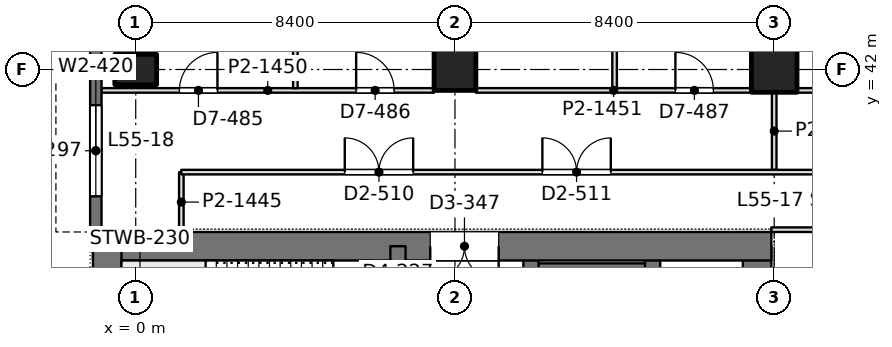
"""IFC4 building model, lengths in metres.
Left out: names, types, materials, properties, quantities, classifications, styles, units other than length and angle.
Written with IfcOpenShell. Run it as: python <this file> out.ifc"""

import sys

from ifc_helpers import new_model, si_unit, direction, frame, frame_2d, origin, origin_2d, place, context, subcontext, project, spatial, rectangle, extrude, element, fill, save


model = new_model("IFC4")
c1 = context("Model", 3, precision=1e-05, world=origin(), true_north=direction((0.0, 1.0)))
c2 = subcontext(c1, "Body", "Model", "MODEL_VIEW")
j1 = project(units=[si_unit("LENGTHUNIT", "METRE"), si_unit("PLANEANGLEUNIT", "RADIAN")], contexts=[c1])
p1 = place(None, origin())
s1 = spatial("IfcSite", under=j1, at=p1, CompositionType="ELEMENT")
p2 = place(p1, origin())
s2 = spatial("IfcBuilding", under=s1, at=p2, CompositionType="ELEMENT")
p3 = place(p2, frame((0.0, 0.0, 240.6)))
s3 = spatial("IfcBuildingStorey", under=s2, at=p3, CompositionType="ELEMENT", Elevation=240.6)
p4 = place(p3, frame((0.0, 42.0, 0.0), z_axis=(0.0, 0.0, 1.0), x_axis=(0.0, 1.0, 0.0)))
e1 = element("IfcColumn", 1, at=p4, inside=s3, PredefinedType="COLUMN", context=c2, shape_type="SweptSolid", body=[
    extrude(rectangle(XDim=0.8, YDim=1.1, at=origin_2d()), origin(), (0.0, 0.0, 1.0), 4.2),
])
p5 = place(p3, frame((8.4, 42.0, 0.0), z_axis=(0.0, 0.0, 1.0), x_axis=(1.0, 0.0, 0.0)))
e2 = element("IfcColumn", 2, at=p5, inside=s3, PredefinedType="COLUMN", context=c2, shape_type="SweptSolid", body=[
    extrude(rectangle(XDim=1.1, YDim=1.1, at=origin_2d()), origin(), (0.0, 0.0, 1.0), 4.2),
])
p6 = place(p3, frame((16.8, 42.0, 0.0), z_axis=(0.0, 0.0, 1.0), x_axis=(1.0, 0.0, 0.0)))
e3 = element("IfcColumn", 3, at=p6, inside=s3, PredefinedType="COLUMN", context=c2, shape_type="SweptSolid", body=[
    extrude(rectangle(XDim=1.2, YDim=1.2, at=origin_2d()), origin(), (0.0, 0.0, 1.0), 4.2),
])
p7 = place(p3, frame((-1.125, 37.35, 0.0), z_axis=(0.0, 0.0, 1.0), x_axis=(1.0, 0.0, 0.0)))
e4 = element("IfcWall", 4, at=p7, inside=s3, PredefinedType="SHEAR", context=c2, shape_type="SweptSolid", body=[
    extrude(rectangle(XDim=17.85, YDim=0.75, at=frame_2d((8.925, 0.0))), origin(), (0.0, 0.0, 1.0), 4.2),
])
p8 = place(p7, frame((8.875, 0.0, 0.0)))
e5 = element("IfcOpeningElement", 5, at=p8, cuts=e4, PredefinedType="OPENING", context=c2, shape_type="SweptSolid", body=[
    extrude(rectangle(XDim=1.8, YDim=2.4, at=frame_2d((0.9, 1.2))), frame((0.0, 0.385, 0.0), z_axis=(0.0, -1.0, 0.0), x_axis=(1.0, 0.0, 0.0)), (0.0, 0.0, 1.0), 0.77),
])
p9 = place(p3, frame((-0.75, 13.05, 0.0), z_axis=(0.0, 0.0, 1.0), x_axis=(0.0, 1.0, 0.0)))
e6 = element("IfcWall", 6, at=p9, inside=s3, PredefinedType="SHEAR", context=c2, shape_type="SweptSolid", body=[
    extrude(rectangle(XDim=24.3, YDim=0.75, at=frame_2d((12.15, 0.0))), origin(), (0.0, 0.0, 1.0), 4.2),
])
p10 = place(p3, frame((16.35, 27.8, 0.0), z_axis=(0.0, 0.0, 1.0), x_axis=(0.0, 1.0, 0.0)))
e7 = element("IfcWall", 7, at=p10, inside=s3, PredefinedType="SHEAR", context=c2, shape_type="SweptSolid", body=[
    extrude(rectangle(XDim=9.55, YDim=0.75, at=frame_2d((4.775, 0.0))), origin(), (0.0, 0.0, 1.0), 4.2),
])
p11 = place(p3, frame((6.9, 13.05, 0.0), z_axis=(0.0, 0.0, 1.0), x_axis=(0.0, 1.0, 0.0)))
e8 = element("IfcWall", 8, at=p11, inside=s3, PredefinedType="SHEAR", context=c2, shape_type="SweptSolid", body=[
    extrude(rectangle(XDim=24.3, YDim=0.4, at=frame_2d((12.15, 0.0))), origin(), (0.0, 0.0, 1.0), 4.2),
])
p12 = place(p11, frame((1.3, 0.0, 0.0)))
e9 = element("IfcOpeningElement", 9, at=p12, cuts=e8, PredefinedType="OPENING", context=c2, shape_type="SweptSolid", body=[
    extrude(rectangle(XDim=1.0, YDim=2.2, at=frame_2d((0.5, 1.1))), frame((0.0, 0.21, 0.0), z_axis=(0.0, -1.0, 0.0), x_axis=(1.0, 0.0, 0.0)), (0.0, 0.0, 1.0), 0.42),
])
p13 = place(p11, frame((22.0, 0.0, 0.0)))
e10 = element("IfcOpeningElement", 10, at=p13, cuts=e8, PredefinedType="OPENING", context=c2, shape_type="SweptSolid", body=[
    extrude(rectangle(XDim=1.0, YDim=2.2, at=frame_2d((0.5, 1.1))), frame((0.0, 0.21, 0.0), z_axis=(0.0, -1.0, 0.0), x_axis=(1.0, 0.0, 0.0)), (0.0, 0.0, 1.0), 0.42),
])
p14 = place(p11, frame((5.55, 0.0, 0.0)))
e11 = element("IfcOpeningElement", 11, at=p14, cuts=e8, PredefinedType="OPENING", context=c2, shape_type="SweptSolid", body=[
    extrude(rectangle(XDim=1.0, YDim=2.2, at=frame_2d((0.5, 1.1))), frame((0.0, 0.21, 0.0), z_axis=(0.0, -1.0, 0.0), x_axis=(1.0, 0.0, 0.0)), (0.0, 0.0, 1.0), 0.42),
])
p15 = place(p11, frame((9.55, 0.0, 0.0)))
e12 = element("IfcOpeningElement", 12, at=p15, cuts=e8, PredefinedType="OPENING", context=c2, shape_type="SweptSolid", body=[
    extrude(rectangle(XDim=1.0, YDim=2.2, at=frame_2d((0.5, 1.1))), frame((0.0, 0.21, 0.0), z_axis=(0.0, -1.0, 0.0), x_axis=(1.0, 0.0, 0.0)), (0.0, 0.0, 1.0), 0.42),
])
p16 = place(p11, frame((12.8, 0.0, 0.0)))
e13 = element("IfcOpeningElement", 13, at=p16, cuts=e8, PredefinedType="OPENING", context=c2, shape_type="SweptSolid", body=[
    extrude(rectangle(XDim=1.1, YDim=2.2, at=frame_2d((0.55, 1.1))), frame((0.0, 0.21, 0.0), z_axis=(0.0, -1.0, 0.0), x_axis=(1.0, 0.0, 0.0)), (0.0, 0.0, 1.0), 0.42),
])
p17 = place(p11, frame((15.538, 0.0, 0.0)))
e14 = element("IfcOpeningElement", 14, at=p17, cuts=e8, PredefinedType="OPENING", context=c2, shape_type="SweptSolid", body=[
    extrude(rectangle(XDim=1.1, YDim=2.2, at=frame_2d((0.55, 1.1))), frame((0.0, 0.21, 0.0), z_axis=(0.0, -1.0, 0.0), x_axis=(1.0, 0.0, 0.0)), (0.0, 0.0, 1.0), 0.42),
])
p18 = place(p11, frame((18.262, 0.0, 0.0)))
e15 = element("IfcOpeningElement", 15, at=p18, cuts=e8, PredefinedType="OPENING", context=c2, shape_type="SweptSolid", body=[
    extrude(rectangle(XDim=1.1, YDim=2.2, at=frame_2d((0.55, 1.1))), frame((0.0, 0.21, 0.0), z_axis=(0.0, -1.0, 0.0), x_axis=(1.0, 0.0, 0.0)), (0.0, 0.0, 1.0), 0.42),
])
p19 = place(p3, frame((10.4, 13.05, 0.0), z_axis=(0.0, 0.0, 1.0), x_axis=(0.0, 1.0, 0.0)))
e16 = element("IfcWall", 16, at=p19, inside=s3, PredefinedType="SHEAR", context=c2, shape_type="SweptSolid", body=[
    extrude(rectangle(XDim=24.3, YDim=0.4, at=frame_2d((12.15, 0.0))), origin(), (0.0, 0.0, 1.0), 4.2),
])
p20 = place(p19, frame((15.75, 0.0, 0.0)))
e17 = element("IfcOpeningElement", 17, at=p20, cuts=e16, PredefinedType="OPENING", context=c2, shape_type="SweptSolid", body=[
    extrude(rectangle(XDim=1.1, YDim=2.2, at=frame_2d((0.55, 1.1))), frame((0.0, 0.21, 0.0), z_axis=(0.0, -1.0, 0.0), x_axis=(1.0, 0.0, 0.0)), (0.0, 0.0, 1.0), 0.42),
])
p21 = place(p19, frame((18.6, 0.0, 0.0)))
e18 = element("IfcOpeningElement", 18, at=p21, cuts=e16, PredefinedType="OPENING", context=c2, shape_type="SweptSolid", body=[
    extrude(rectangle(XDim=1.1, YDim=2.2, at=frame_2d((0.55, 1.1))), frame((0.0, 0.21, 0.0), z_axis=(0.0, -1.0, 0.0), x_axis=(1.0, 0.0, 0.0)), (0.0, 0.0, 1.0), 0.42),
])
p22 = place(p19, frame((21.45, 0.0, 0.0)))
e19 = element("IfcOpeningElement", 19, at=p22, cuts=e16, PredefinedType="OPENING", context=c2, shape_type="SweptSolid", body=[
    extrude(rectangle(XDim=1.1, YDim=2.2, at=frame_2d((0.55, 1.1))), frame((0.0, 0.21, 0.0), z_axis=(0.0, -1.0, 0.0), x_axis=(1.0, 0.0, 0.0)), (0.0, 0.0, 1.0), 0.42),
])
p23 = place(p19, frame((8.65, 0.0, 0.0)))
e20 = element("IfcOpeningElement", 20, at=p23, cuts=e16, PredefinedType="OPENING", context=c2, shape_type="SweptSolid", body=[
    extrude(rectangle(XDim=1.8, YDim=2.4, at=frame_2d((0.9, 1.2))), frame((0.0, 0.21, 0.0), z_axis=(0.0, -1.0, 0.0), x_axis=(1.0, 0.0, 0.0)), (0.0, 0.0, 1.0), 0.42),
])
p24 = place(p3, frame((13.6, 27.925, 0.0), z_axis=(0.0, 0.0, 1.0), x_axis=(0.0, 1.0, 0.0)))
e21 = element("IfcWall", 21, at=p24, inside=s3, PredefinedType="SHEAR", context=c2, shape_type="SweptSolid", body=[
    extrude(rectangle(XDim=9.425, YDim=0.4, at=frame_2d((4.712, 0.0))), origin(), (0.0, 0.0, 1.0), 4.2),
])
p25 = place(p3, frame((10.4, 36.625, 0.0), z_axis=(0.0, 0.0, 1.0), x_axis=(1.0, 0.0, 0.0)))
e22 = element("IfcWall", 22, at=p25, inside=s3, PredefinedType="SHEAR", context=c2, shape_type="SweptSolid", body=[
    extrude(rectangle(XDim=3.2, YDim=0.55, at=frame_2d((1.6, 0.0))), origin(), (0.0, 0.0, 1.0), 4.2),
])
p26 = place(p3, frame((-1.05, 37.725, 0.0), z_axis=(0.0, 0.0, 1.0), x_axis=(0.0, 1.0, 0.0)))
e23 = element("IfcWall", 23, at=p26, inside=s3, PredefinedType="SOLIDWALL", context=c2, shape_type="SweptSolid", body=[
    extrude(rectangle(XDim=4.275, YDim=0.3, at=frame_2d((2.137, 0.0))), origin(), (0.0, 0.0, 1.0), 4.0),
])
p27 = place(p26, frame((0.938, 0.0, 0.9)))
e24 = element("IfcOpeningElement", 24, at=p27, cuts=e23, PredefinedType="OPENING", context=c2, shape_type="SweptSolid", body=[
    extrude(rectangle(XDim=2.4, YDim=1.9, at=frame_2d((1.2, 0.95))), frame((0.0, 0.16, 0.0), z_axis=(0.0, -1.0, 0.0), x_axis=(1.0, 0.0, 0.0)), (0.0, 0.0, 1.0), 0.32),
])
p28 = place(p3, frame((-1.05, 42.0, 0.0), z_axis=(0.0, 0.0, 1.0), x_axis=(0.0, 1.0, 0.0)))
e25 = element("IfcWall", 25, at=p28, inside=s3, PredefinedType="SOLIDWALL", context=c2, shape_type="SweptSolid", body=[
    extrude(rectangle(XDim=2.485, YDim=0.3, at=frame_2d((1.243, 0.0))), origin(), (0.0, 0.0, 1.0), 4.0),
])
p29 = place(p3, frame((-0.902, 41.45, 0.0), z_axis=(0.0, 0.0, 1.0), x_axis=(1.0, 0.0, 0.0)))
e26 = element("IfcWall", 26, at=p29, inside=s3, PredefinedType="PARTITIONING", context=c2, shape_type="SweptSolid", body=[
    extrude(rectangle(XDim=8.751, YDim=0.12, at=frame_2d((4.375, 0.0))), origin(), (0.0, 0.0, 1.0), 3.4),
])
p30 = place(p29, frame((2.052, 0.0, 0.0)))
e27 = element("IfcOpeningElement", 27, at=p30, cuts=e26, PredefinedType="OPENING", context=c2, shape_type="SweptSolid", body=[
    extrude(rectangle(XDim=1.0, YDim=2.4, at=frame_2d((0.5, 1.2))), frame((0.0, 0.07, 0.0), z_axis=(0.0, -1.0, 0.0), x_axis=(1.0, 0.0, 0.0)), (0.0, 0.0, 1.0), 0.14),
])
p31 = place(p29, frame((6.702, 0.0, 0.0)))
e28 = element("IfcOpeningElement", 28, at=p31, cuts=e26, PredefinedType="OPENING", context=c2, shape_type="SweptSolid", body=[
    extrude(rectangle(XDim=1.0, YDim=2.4, at=frame_2d((0.5, 1.2))), frame((0.0, 0.07, 0.0), z_axis=(0.0, -1.0, 0.0), x_axis=(1.0, 0.0, 0.0)), (0.0, 0.0, 1.0), 0.14),
])
p32 = place(p3, frame((8.951, 41.45, 0.0), z_axis=(0.0, 0.0, 1.0), x_axis=(1.0, 0.0, 0.0)))
e29 = element("IfcWall", 29, at=p32, inside=s3, PredefinedType="PARTITIONING", context=c2, shape_type="SweptSolid", body=[
    extrude(rectangle(XDim=7.25, YDim=0.12, at=frame_2d((3.625, 0.0))), origin(), (0.0, 0.0, 1.0), 3.4),
])
p33 = place(p32, frame((5.249, 0.0, 0.0)))
e30 = element("IfcOpeningElement", 30, at=p33, cuts=e29, PredefinedType="OPENING", context=c2, shape_type="SweptSolid", body=[
    extrude(rectangle(XDim=1.0, YDim=2.4, at=frame_2d((0.5, 1.2))), frame((0.0, 0.07, 0.0), z_axis=(0.0, -1.0, 0.0), x_axis=(1.0, 0.0, 0.0)), (0.0, 0.0, 1.0), 0.14),
])
p34 = place(p3, frame((17.399, 41.45, 0.0), z_axis=(0.0, 0.0, 1.0), x_axis=(1.0, 0.0, 0.0)))
e31 = element("IfcWall", 31, at=p34, inside=s3, PredefinedType="PARTITIONING", context=c2, shape_type="SweptSolid", body=[
    extrude(rectangle(XDim=7.25, YDim=0.12, at=frame_2d((3.625, 0.0))), origin(), (0.0, 0.0, 1.0), 3.4),
])
p35 = place(p34, frame((4.801, 0.0, 0.0)))
e32 = element("IfcOpeningElement", 32, at=p35, cuts=e31, PredefinedType="OPENING", context=c2, shape_type="SweptSolid", body=[
    extrude(rectangle(XDim=1.8, YDim=2.2, at=frame_2d((0.9, 1.1))), frame((0.0, 0.07, 0.0), z_axis=(0.0, -1.0, 0.0), x_axis=(1.0, 0.0, 0.0)), (0.0, 0.0, 1.0), 0.14),
])
for number, where, z_axis, x_axis in (
    (33, (4.2, 41.508, 0.0), (0.0, 0.0, 1.0), (0.0, 1.0, 0.0)),
    (34, (12.6, 41.508, 0.0), (0.0, 0.0, 1.0), (0.0, 1.0, 0.0)),
):
    element("IfcWall", number, at=place(p3, frame(where, z_axis=z_axis, x_axis=x_axis)), inside=s3, PredefinedType="PARTITIONING", context=c2, shape_type="SweptSolid", body=[
        extrude(rectangle(XDim=4.194, YDim=0.12, at=frame_2d((2.097, 0.0))), origin(), (0.0, 0.0, 1.0), 3.3),
    ])
p36 = place(p3, frame((16.8, 39.358, 0.0), z_axis=(0.0, 0.0, 1.0), x_axis=(0.0, 1.0, 0.0)))
e35 = element("IfcWall", 35, at=p36, inside=s3, PredefinedType="PARTITIONING", context=c2, shape_type="SweptSolid", body=[
    extrude(rectangle(XDim=2.043, YDim=0.12, at=frame_2d((1.021, 0.0))), origin(), (0.0, 0.0, 1.0), 3.543),
])
p37 = place(p3, frame((1.2, 39.3, 0.0), z_axis=(0.0, 0.0, 1.0), x_axis=(1.0, 0.0, 0.0)))
e36 = element("IfcWall", 36, at=p37, inside=s3, PredefinedType="PARTITIONING", context=c2, shape_type="SweptSolid", body=[
    extrude(rectangle(XDim=41.452, YDim=0.12, at=frame_2d((20.726, 0.0))), origin(), (0.0, 0.0, 1.0), 3.3),
])
p38 = place(p37, frame((4.3, 0.0, 0.0)))
e37 = element("IfcOpeningElement", 37, at=p38, cuts=e36, PredefinedType="OPENING", context=c2, shape_type="SweptSolid", body=[
    extrude(rectangle(XDim=1.8, YDim=2.2, at=frame_2d((0.9, 1.1))), frame((0.0, 0.07, 0.0), z_axis=(0.0, -1.0, 0.0), x_axis=(1.0, 0.0, 0.0)), (0.0, 0.0, 1.0), 0.14),
])
p39 = place(p37, frame((9.5, 0.0, 0.0)))
e38 = element("IfcOpeningElement", 38, at=p39, cuts=e36, PredefinedType="OPENING", context=c2, shape_type="SweptSolid", body=[
    extrude(rectangle(XDim=1.8, YDim=2.2, at=frame_2d((0.9, 1.1))), frame((0.0, 0.07, 0.0), z_axis=(0.0, -1.0, 0.0), x_axis=(1.0, 0.0, 0.0)), (0.0, 0.0, 1.0), 0.14),
])
p40 = place(p37, frame((23.317, 0.0, 0.0)))
e39 = element("IfcOpeningElement", 39, at=p40, cuts=e36, PredefinedType="OPENING", context=c2, shape_type="SweptSolid", body=[
    extrude(rectangle(XDim=1.8, YDim=2.2, at=frame_2d((0.9, 1.1))), frame((0.0, 0.07, 0.0), z_axis=(0.0, -1.0, 0.0), x_axis=(1.0, 0.0, 0.0)), (0.0, 0.0, 1.0), 0.14),
])
p41 = place(p37, frame((33.0, 0.0, 0.0)))
e40 = element("IfcOpeningElement", 40, at=p41, cuts=e36, PredefinedType="OPENING", context=c2, shape_type="SweptSolid", body=[
    extrude(rectangle(XDim=1.8, YDim=2.2, at=frame_2d((0.9, 1.1))), frame((0.0, 0.07, 0.0), z_axis=(0.0, -1.0, 0.0), x_axis=(1.0, 0.0, 0.0)), (0.0, 0.0, 1.0), 0.14),
])
p42 = place(p3, frame((1.2, 37.724, 0.0), z_axis=(0.0, 0.0, 1.0), x_axis=(0.0, 1.0, 0.0)))
e41 = element("IfcWall", 41, at=p42, inside=s3, PredefinedType="PARTITIONING", context=c2, shape_type="SweptSolid", body=[
    extrude(rectangle(XDim=1.576, YDim=0.12, at=frame_2d((0.788, 0.0))), origin(), (0.0, 0.0, 1.0), 4.0),
])
p43 = place(p3, frame((16.725, 37.785, 0.0), z_axis=(0.0, 0.0, 1.0), x_axis=(1.0, 0.0, 0.0)))
e42 = element("IfcWall", 42, at=p43, inside=s3, PredefinedType="PARTITIONING", context=c2, shape_type="SweptSolid", body=[
    extrude(rectangle(XDim=16.95, YDim=0.12, at=frame_2d((8.475, 0.0))), origin(), (0.0, 0.0, 1.0), 3.3),
])
p44 = place(p43, frame((7.575, 0.0, 0.0)))
e43 = element("IfcOpeningElement", 43, at=p44, cuts=e42, PredefinedType="OPENING", context=c2, shape_type="SweptSolid", body=[
    extrude(rectangle(XDim=1.8, YDim=2.2, at=frame_2d((0.9, 1.1))), frame((0.0, 0.07, 0.0), z_axis=(0.0, -1.0, 0.0), x_axis=(1.0, 0.0, 0.0)), (0.0, 0.0, 1.0), 0.14),
])
p45 = place(p27, origin())
e44 = element("IfcWindow", 44, at=p45, inside=s3, PartitioningType="SINGLE_PANEL", PredefinedType="WINDOW", context=c2, shape_type="SweptSolid", body=[
    extrude(rectangle(XDim=2.4, YDim=1.9, at=frame_2d((1.2, 0.95))), frame((0.0, 0.03, 0.0), z_axis=(0.0, -1.0, 0.0), x_axis=(1.0, 0.0, 0.0)), (0.0, 0.0, 1.0), 0.06),
])
fill(e24, e44)
p46 = place(p8, frame((1.8, 0.0, 0.0), z_axis=(0.0, 0.0, 1.0), x_axis=(-1.0, 0.0, 0.0)))
e45 = element("IfcDoor", 45, at=p46, inside=s3, OperationType="DOUBLE_DOOR_SINGLE_SWING", PredefinedType="DOOR", context=c2, shape_type="SweptSolid", body=[
    extrude(rectangle(XDim=1.8, YDim=2.4, at=frame_2d((0.9, 1.2))), frame((0.0, 0.025, 0.0), z_axis=(0.0, -1.0, 0.0), x_axis=(1.0, 0.0, 0.0)), (0.0, 0.0, 1.0), 0.05),
])
fill(e5, e45)
p47 = place(p30, origin())
e46 = element("IfcDoor", 46, at=p47, inside=s3, OperationType="SINGLE_SWING_RIGHT", PredefinedType="DOOR", context=c2, shape_type="SweptSolid", body=[
    extrude(rectangle(XDim=1.0, YDim=2.4, at=frame_2d((0.5, 1.2))), frame((0.0, 0.025, 0.0), z_axis=(0.0, -1.0, 0.0), x_axis=(1.0, 0.0, 0.0)), (0.0, 0.0, 1.0), 0.05),
])
fill(e27, e46)
p48 = place(p31, origin())
e47 = element("IfcDoor", 47, at=p48, inside=s3, OperationType="SINGLE_SWING_LEFT", PredefinedType="DOOR", context=c2, shape_type="SweptSolid", body=[
    extrude(rectangle(XDim=1.0, YDim=2.4, at=frame_2d((0.5, 1.2))), frame((0.0, 0.025, 0.0), z_axis=(0.0, -1.0, 0.0), x_axis=(1.0, 0.0, 0.0)), (0.0, 0.0, 1.0), 0.05),
])
fill(e28, e47)
p49 = place(p33, origin())
e48 = element("IfcDoor", 48, at=p49, inside=s3, OperationType="SINGLE_SWING_LEFT", PredefinedType="DOOR", context=c2, shape_type="SweptSolid", body=[
    extrude(rectangle(XDim=1.0, YDim=2.4, at=frame_2d((0.5, 1.2))), frame((0.0, 0.025, 0.0), z_axis=(0.0, -1.0, 0.0), x_axis=(1.0, 0.0, 0.0)), (0.0, 0.0, 1.0), 0.05),
])
fill(e30, e48)
p50 = place(p38, origin())
e49 = element("IfcDoor", 49, at=p50, inside=s3, OperationType="DOUBLE_DOOR_SINGLE_SWING", PredefinedType="DOOR", context=c2, shape_type="SweptSolid", body=[
    extrude(rectangle(XDim=1.8, YDim=2.2, at=frame_2d((0.9, 1.1))), frame((0.0, 0.025, 0.0), z_axis=(0.0, -1.0, 0.0), x_axis=(1.0, 0.0, 0.0)), (0.0, 0.0, 1.0), 0.05),
])
fill(e37, e49)
p51 = place(p39, origin())
e50 = element("IfcDoor", 50, at=p51, inside=s3, OperationType="DOUBLE_DOOR_SINGLE_SWING", PredefinedType="DOOR", context=c2, shape_type="SweptSolid", body=[
    extrude(rectangle(XDim=1.8, YDim=2.2, at=frame_2d((0.9, 1.1))), frame((0.0, 0.025, 0.0), z_axis=(0.0, -1.0, 0.0), x_axis=(1.0, 0.0, 0.0)), (0.0, 0.0, 1.0), 0.05),
])
fill(e38, e50)
save(model, sys.argv[1])
